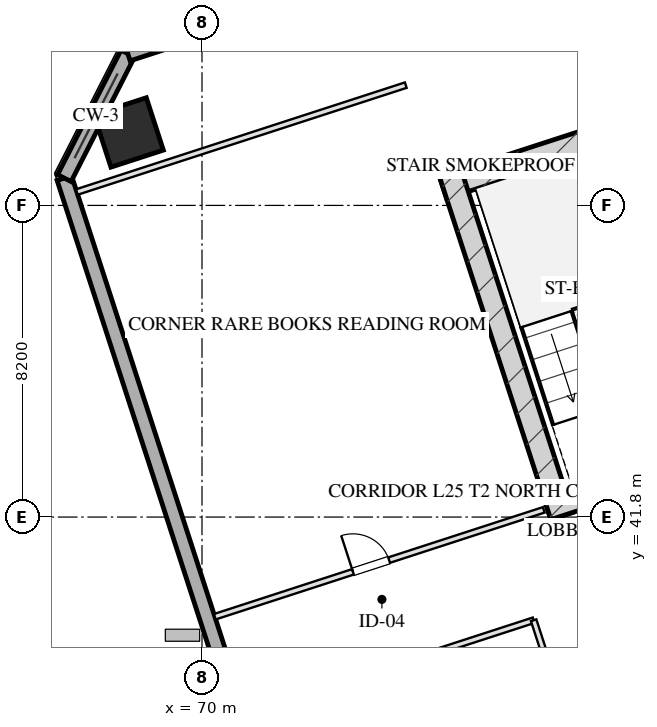
"""IFC4 building model, lengths in metres.
Left out: names, types, materials, properties, quantities, classifications, styles, units other than length and angle.
Written with IfcOpenShell. Run it as: python <this file> out.ifc"""

import sys

from ifc_helpers import new_model, si_unit, direction, frame, frame_2d, origin, origin_2d, place, context, subcontext, project, spatial, rectangle, hollow_rectangle, extrude, element, fill, save


model = new_model("IFC4")
c1 = context("Model", 3, precision=1e-05, world=origin(), true_north=direction((0.0, 1.0)))
c2 = subcontext(c1, "Body", "Model", "MODEL_VIEW")
j1 = project(units=[si_unit("LENGTHUNIT", "METRE"), si_unit("PLANEANGLEUNIT", "RADIAN")], contexts=[c1])
p1 = place(None, origin())
s1 = spatial("IfcSite", under=j1, at=p1, CompositionType="ELEMENT")
p2 = place(p1, origin())
s2 = spatial("IfcBuilding", under=s1, at=p2, CompositionType="ELEMENT")
p3 = place(p2, frame((0.0, 0.0, 100.05)))
s3 = spatial("IfcBuildingStorey", under=s2, at=p3, CompositionType="ELEMENT", Elevation=100.05)
p4 = place(p3, frame((76.344, 50.466, 0.0), z_axis=(0.0, 0.0, 1.0), x_axis=(0.951055727519, 0.309019421968, 0.0)))
e1 = element("IfcWall", 1, at=p4, inside=s3, PredefinedType="SHEAR", context=c2, shape_type="SweptSolid", body=[
    extrude(rectangle(XDim=16.4, YDim=0.6, at=frame_2d((8.2, 0.0))), origin(), (0.0, 0.0, 1.0), 3.45),
])
p5 = place(p3, frame((79.466, 41.828, 0.0), z_axis=(0.0, 0.0, 1.0), x_axis=(-0.309041232772, 0.951048640421, 0.0)))
e2 = element("IfcWall", 2, at=p5, inside=s3, PredefinedType="SHEAR", context=c2, shape_type="SweptSolid", body=[
    extrude(rectangle(XDim=9.48, YDim=0.6, at=frame_2d((4.74, 0.0))), origin(), (0.0, 0.0, 1.0), 3.45),
])
p6 = place(p3, frame((79.087, 42.021, 0.0), z_axis=(0.0, 0.0, 1.0), x_axis=(0.951062550203, 0.3089984233, 0.0)))
e3 = element("IfcWall", 3, at=p6, inside=s3, PredefinedType="SHEAR", context=c2, shape_type="SweptSolid", body=[
    extrude(rectangle(XDim=4.22, YDim=0.6, at=frame_2d((2.11, 0.0))), origin(), (0.0, 0.0, 1.0), 3.45),
])
p7 = place(p3, frame((68.069, 51.92, 0.0), z_axis=(0.0, 0.0, 1.0), x_axis=(0.951056516295, 0.309016994375, 0.0)))
e4 = element("IfcColumn", 4, at=p7, inside=s3, PredefinedType="COLUMN", context=c2, shape_type="SweptSolid", body=[
    extrude(hollow_rectangle(XDim=1.45, YDim=1.45, WallThickness=0.05, at=origin_2d()), origin(), (0.0, 0.0, 1.0), 3.451),
])
p8 = place(p3, frame((80.716, 6.59, 0.0), z_axis=(0.0, 0.0, 1.0), x_axis=(-0.309017542002, 0.95105633836, 0.0)))
e5 = element("IfcWall", 5, at=p8, inside=s3, PredefinedType="SOLIDWALL", context=c2, shape_type="SweptSolid", body=[
    extrude(rectangle(XDim=46.4, YDim=0.4, at=frame_2d((23.2, 0.0))), origin(), (0.0, 0.0, 1.0), 2.55),
])
p9 = place(p8, frame((15.6, 0.0, 0.75)))
e6 = element("IfcOpeningElement", 6, at=p9, cuts=e5, PredefinedType="OPENING", context=c2, shape_type="SweptSolid", body=[
    extrude(rectangle(XDim=2.4, YDim=1.4, at=frame_2d((1.2, 0.7))), frame((0.0, 0.21, 0.0), z_axis=(0.0, -1.0, 0.0), x_axis=(1.0, 0.0, 0.0)), (0.0, 0.0, 1.0), 0.42),
])
p10 = place(p8, frame((19.4, 0.0, 0.75)))
e7 = element("IfcOpeningElement", 7, at=p10, cuts=e5, PredefinedType="OPENING", context=c2, shape_type="SweptSolid", body=[
    extrude(rectangle(XDim=2.4, YDim=1.4, at=frame_2d((1.2, 0.7))), frame((0.0, 0.21, 0.0), z_axis=(0.0, -1.0, 0.0), x_axis=(1.0, 0.0, 0.0)), (0.0, 0.0, 1.0), 0.42),
])
p11 = place(p8, frame((25.496, 0.0, 0.0)))
e8 = element("IfcOpeningElement", 8, at=p11, cuts=e5, PredefinedType="OPENING", context=c2, shape_type="SweptSolid", body=[
    extrude(rectangle(XDim=1.1, YDim=2.15, at=frame_2d((0.55, 1.075))), frame((0.0, 0.21, 0.0), z_axis=(0.0, -1.0, 0.0), x_axis=(1.0, 0.0, 0.0)), (0.0, 0.0, 1.0), 0.42),
])
p12 = place(p3, frame((66.377, 50.719, 0.0), z_axis=(0.0, 0.0, 1.0), x_axis=(0.454026238093, 0.890988313685, 0.0)))
e9 = element("IfcWall", 9, at=p12, inside=s3, PredefinedType="SOLIDWALL", context=c2, shape_type="SweptSolid", body=[
    extrude(rectangle(XDim=3.677, YDim=0.4, at=frame_2d((1.838, 0.0))), origin(), (0.0, 0.0, 1.0), 2.55),
])
p13 = place(p3, frame((68.047, 53.995, 0.0), z_axis=(0.0, 0.0, 1.0), x_axis=(0.95105505922, 0.309021478754, 0.0)))
e10 = element("IfcWall", 10, at=p13, inside=s3, PredefinedType="SOLIDWALL", context=c2, shape_type="SweptSolid", body=[
    extrude(rectangle(XDim=29.4, YDim=0.4, at=frame_2d((14.7, 0.0))), origin(), (0.0, 0.0, 1.0), 2.55),
])
p14 = place(p3, frame((66.707, 50.352, 0.0), z_axis=(0.0, 0.0, 1.0), x_axis=(0.951057133767, 0.309015093986, 0.0)))
e11 = element("IfcWall", 11, at=p14, inside=s3, PredefinedType="PARTITIONING", context=c2, shape_type="SweptSolid", body=[
    extrude(rectangle(XDim=9.1, YDim=0.15, at=frame_2d((4.55, 0.0))), origin(), (0.0, 0.0, 1.0), 3.155),
])
p15 = place(p3, frame((70.338, 39.177, 0.0), z_axis=(0.0, 0.0, 1.0), x_axis=(0.951059695568, 0.309007209409, 0.0)))
e12 = element("IfcWall", 12, at=p15, inside=s3, PredefinedType="PARTITIONING", context=c2, shape_type="SweptSolid", body=[
    extrude(rectangle(XDim=9.1, YDim=0.15, at=frame_2d((4.55, 0.0))), origin(), (0.0, 0.0, 1.0), 3.155),
])
p16 = place(p15, frame((3.822, 0.0, 0.0)))
e13 = element("IfcOpeningElement", 13, at=p16, cuts=e12, PredefinedType="OPENING", context=c2, shape_type="SweptSolid", body=[
    extrude(rectangle(XDim=1.0, YDim=2.05, at=frame_2d((0.5, 1.025))), frame((0.0, 0.085, 0.0), z_axis=(0.0, -1.0, 0.0), x_axis=(1.0, 0.0, 0.0)), (0.0, 0.0, 1.0), 0.17),
])
p17 = place(p3, frame((71.166, 36.629, 0.0), z_axis=(0.0, 0.0, 1.0), x_axis=(0.951060470027, 0.309004825775, 0.0)))
e14 = element("IfcWall", 14, at=p17, inside=s3, PredefinedType="PARTITIONING", context=c2, shape_type="SweptSolid", body=[
    extrude(rectangle(XDim=7.95, YDim=0.15, at=frame_2d((3.975, 0.0))), origin(), (0.0, 0.0, 1.0), 3.155),
])
p18 = place(p3, frame((83.869, 23.26, 0.0), z_axis=(0.0, 0.0, 1.0), x_axis=(-0.309022042254, 0.951054876125, 0.0)))
e15 = element("IfcWall", 15, at=p18, inside=s3, PredefinedType="PARTITIONING", context=c2, shape_type="SweptSolid", body=[
    extrude(rectangle(XDim=16.64, YDim=0.15, at=frame_2d((8.32, 0.0))), origin(), (0.0, 0.0, 1.0), 3.155),
])
p19 = place(p18, frame((1.58, 0.0, 0.0)))
e16 = element("IfcOpeningElement", 16, at=p19, cuts=e15, PredefinedType="OPENING", context=c2, shape_type="SweptSolid", body=[
    extrude(rectangle(XDim=1.0, YDim=2.05, at=frame_2d((0.5, 1.025))), frame((0.0, 0.085, 0.0), z_axis=(0.0, -1.0, 0.0), x_axis=(1.0, 0.0, 0.0)), (0.0, 0.0, 1.0), 0.17),
])
p20 = place(p18, frame((6.08, 0.0, 0.0)))
e17 = element("IfcOpeningElement", 17, at=p20, cuts=e15, PredefinedType="OPENING", context=c2, shape_type="SweptSolid", body=[
    extrude(rectangle(XDim=1.0, YDim=2.05, at=frame_2d((0.5, 1.025))), frame((0.0, 0.085, 0.0), z_axis=(0.0, -1.0, 0.0), x_axis=(1.0, 0.0, 0.0)), (0.0, 0.0, 1.0), 0.17),
])
p21 = place(p18, frame((10.406, 0.0, 0.0)))
e18 = element("IfcOpeningElement", 18, at=p21, cuts=e15, PredefinedType="OPENING", context=c2, shape_type="SweptSolid", body=[
    extrude(rectangle(XDim=1.0, YDim=2.05, at=frame_2d((0.5, 1.025))), frame((0.0, 0.085, 0.0), z_axis=(0.0, -1.0, 0.0), x_axis=(1.0, 0.0, 0.0)), (0.0, 0.0, 1.0), 0.17),
])
p22 = place(p18, frame((14.226, 0.0, 0.0)))
e19 = element("IfcOpeningElement", 19, at=p22, cuts=e15, PredefinedType="OPENING", context=c2, shape_type="SweptSolid", body=[
    extrude(rectangle(XDim=1.0, YDim=2.05, at=frame_2d((0.5, 1.025))), frame((0.0, 0.085, 0.0), z_axis=(0.0, -1.0, 0.0), x_axis=(1.0, 0.0, 0.0)), (0.0, 0.0, 1.0), 0.17),
])
p23 = place(p16, origin())
e20 = element("IfcDoor", 20, at=p23, inside=s3, OperationType="SINGLE_SWING_LEFT", PredefinedType="DOOR", context=c2, shape_type="SweptSolid", body=[
    extrude(rectangle(XDim=1.0, YDim=2.05, at=frame_2d((0.5, 1.025))), frame((0.0, 0.025, 0.0), z_axis=(0.0, -1.0, 0.0), x_axis=(1.0, 0.0, 0.0)), (0.0, 0.0, 1.0), 0.05),
])
fill(e13, e20)
save(model, sys.argv[1])
